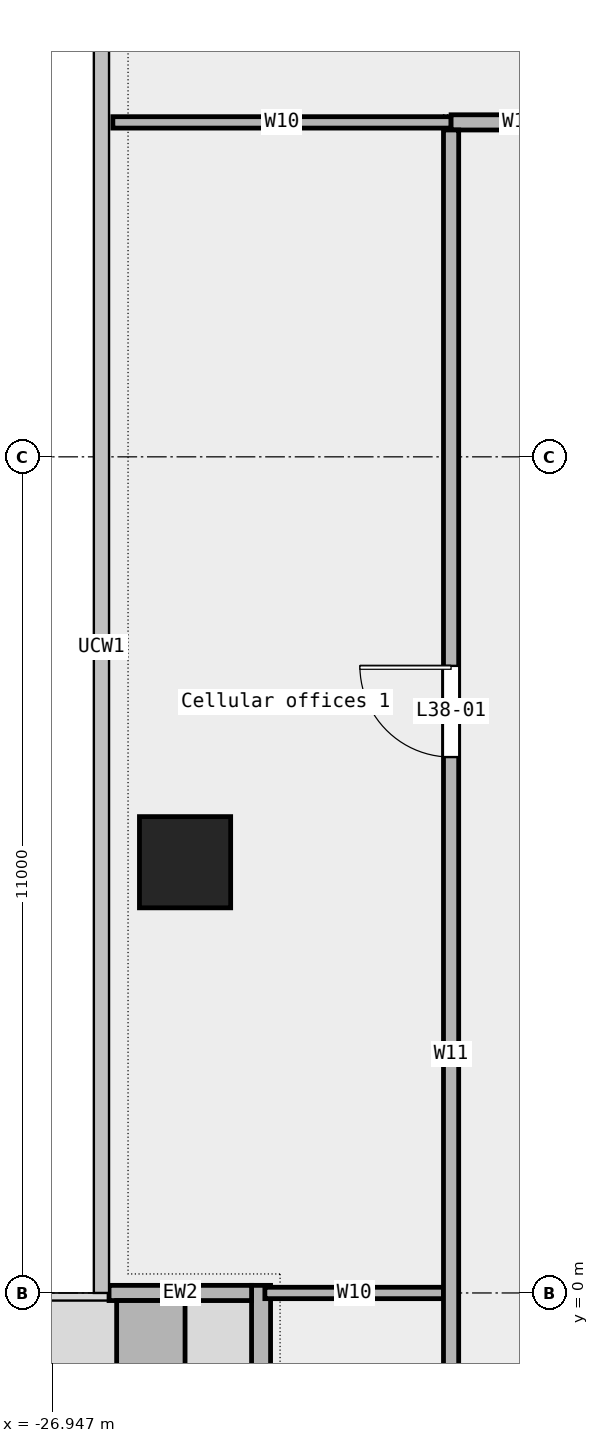
"""IFC4 building model, lengths in metres.
Left out: names, types, materials, properties, quantities, classifications, styles, units other than length and angle.
Written with IfcOpenShell. Run it as: python <this file> out.ifc"""

import sys

from ifc_helpers import new_model, si_unit, direction, frame, frame_2d, origin, origin_2d, place, context, subcontext, project, spatial, rectangle, extrude, element, fill, save


model = new_model("IFC4")
c1 = context("Model", 3, precision=1e-05, world=origin(), true_north=direction((0.0, 1.0)))
c2 = subcontext(c1, "Body", "Model", "MODEL_VIEW")
j1 = project(units=[si_unit("LENGTHUNIT", "METRE"), si_unit("PLANEANGLEUNIT", "RADIAN")], contexts=[c1])
p1 = place(None, origin())
s1 = spatial("IfcSite", under=j1, at=p1, CompositionType="ELEMENT")
p2 = place(p1, origin())
s2 = spatial("IfcBuilding", under=s1, at=p2, CompositionType="ELEMENT")
p3 = place(p2, frame((0.0, 0.0, 185.0)))
s3 = spatial("IfcBuildingStorey", under=s2, at=p3, CompositionType="ELEMENT", Elevation=185.0)
p4 = place(p3, frame((-25.2, 5.667, 0.0), z_axis=(0.0, 0.0, 1.0), x_axis=(1.0, 0.0, 0.0)))
e1 = element("IfcColumn", 1, at=p4, inside=s3, PredefinedType="COLUMN", context=c2, shape_type="SweptSolid", body=[
    extrude(rectangle(XDim=1.2, YDim=1.2, at=origin_2d()), origin(), (0.0, 0.0, 1.0), 3.6),
])
p5 = place(p3, frame((-24.2, 0.1, 0.0), z_axis=(0.0, 0.0, 1.0), x_axis=(0.0, -1.0, 0.0)))
e2 = element("IfcWall", 2, at=p5, inside=s3, PredefinedType="STANDARD", context=c2, shape_type="SweptSolid", body=[
    extrude(rectangle(XDim=12.95, YDim=0.25, at=frame_2d((6.475, 0.0))), origin(), (0.0, 0.0, 1.0), 3.6),
])
p6 = place(p5, frame((1.5, 0.0, 0.45)))
e3 = element("IfcOpeningElement", 3, at=p6, cuts=e2, PredefinedType="OPENING", context=c2, shape_type="SweptSolid", body=[
    extrude(rectangle(XDim=1.5, YDim=2.4, at=frame_2d((0.75, 1.2))), frame((0.0, 0.137, 0.0), z_axis=(0.0, -1.0, 0.0), x_axis=(1.0, 0.0, 0.0)), (0.0, 0.0, 1.0), 0.274),
])
p7 = place(p5, frame((6.75, 0.0, 0.0)))
e4 = element("IfcOpeningElement", 4, at=p7, cuts=e2, PredefinedType="OPENING", context=c2, shape_type="SweptSolid", body=[
    extrude(rectangle(XDim=1.8, YDim=2.4, at=frame_2d((0.9, 1.2))), frame((0.0, 0.137, 0.0), z_axis=(0.0, -1.0, 0.0), x_axis=(1.0, 0.0, 0.0)), (0.0, 0.0, 1.0), 0.274),
])
p8 = place(p5, frame((10.0, 0.0, 0.45)))
e5 = element("IfcOpeningElement", 5, at=p8, cuts=e2, PredefinedType="OPENING", context=c2, shape_type="SweptSolid", body=[
    extrude(rectangle(XDim=1.5, YDim=2.4, at=frame_2d((0.75, 1.2))), frame((0.0, 0.137, 0.0), z_axis=(0.0, -1.0, 0.0), x_axis=(1.0, 0.0, 0.0)), (0.0, 0.0, 1.0), 0.274),
])
p9 = place(p3, frame((-26.2, 0.0, 0.0), z_axis=(0.0, 0.0, 1.0), x_axis=(1.0, 0.0, 0.0)))
e6 = element("IfcWall", 6, at=p9, inside=s3, PredefinedType="STANDARD", context=c2, shape_type="SweptSolid", body=[
    extrude(rectangle(XDim=1.875, YDim=0.2, at=frame_2d((0.938, 0.0))), origin(), (0.0, 0.0, 1.0), 3.6),
])
p10 = place(p3, frame((-25.65, -0.1, 0.0), z_axis=(0.0, 0.0, 1.0), x_axis=(0.0, -1.0, 0.0)))
e7 = element("IfcWall", 7, at=p10, inside=s3, PredefinedType="STANDARD", context=c2, shape_type="SweptSolid", body=[
    extrude(rectangle(XDim=3.6, YDim=0.9, at=frame_2d((1.8, 0.0))), origin(), (0.0, 0.0, 1.0), 0.7),
])
p11 = place(p3, frame((-24.15, 0.0, 0.0), z_axis=(0.0, 0.0, 1.0), x_axis=(1.0, 0.0, 0.0)))
e8 = element("IfcWall", 8, at=p11, inside=s3, PredefinedType="PARTITIONING", context=c2, shape_type="SweptSolid", body=[
    extrude(rectangle(XDim=2.35, YDim=0.15, at=frame_2d((1.175, 0.0))), origin(), (0.0, 0.0, 1.0), 3.6),
])
p12 = place(p3, frame((-26.15, 15.4, 0.0), z_axis=(0.0, 0.0, 1.0), x_axis=(1.0, 0.0, 0.0)))
e9 = element("IfcWall", 9, at=p12, inside=s3, PredefinedType="PARTITIONING", context=c2, shape_type="SweptSolid", body=[
    extrude(rectangle(XDim=4.45, YDim=0.15, at=frame_2d((2.225, 0.0))), origin(), (0.0, 0.0, 1.0), 3.6),
])
p13 = place(p3, frame((-21.7, 15.4, 0.0), z_axis=(0.0, 0.0, 1.0), x_axis=(1.0, 0.0, 0.0)))
e10 = element("IfcWall", 10, at=p13, inside=s3, PredefinedType="PARTITIONING", context=c2, shape_type="SweptSolid", body=[
    extrude(rectangle(XDim=1.8, YDim=0.2, at=frame_2d((0.9, 0.0))), origin(), (0.0, 0.0, 1.0), 3.6),
])
p14 = place(p3, frame((-21.7, -9.0, 0.0), z_axis=(0.0, 0.0, 1.0), x_axis=(0.0, 1.0, 0.0)))
e11 = element("IfcWall", 11, at=p14, inside=s3, PredefinedType="PARTITIONING", context=c2, shape_type="SweptSolid", body=[
    extrude(rectangle(XDim=24.3, YDim=0.2, at=frame_2d((12.15, 0.0))), origin(), (0.0, 0.0, 1.0), 3.6),
])
p15 = place(p14, frame((16.05, 0.0, 0.0)))
e12 = element("IfcOpeningElement", 12, at=p15, cuts=e11, PredefinedType="OPENING", context=c2, shape_type="SweptSolid", body=[
    extrude(rectangle(XDim=1.2, YDim=2.1, at=frame_2d((0.6, 1.05))), frame((0.0, 0.112, 0.0), z_axis=(0.0, -1.0, 0.0), x_axis=(1.0, 0.0, 0.0)), (0.0, 0.0, 1.0), 0.224),
])
p16 = place(p15, origin())
e13 = element("IfcDoor", 13, at=p16, inside=s3, OperationType="SINGLE_SWING_RIGHT", PredefinedType="DOOR", context=c2, shape_type="SweptSolid", body=[
    extrude(rectangle(XDim=1.2, YDim=2.1, at=frame_2d((0.6, 1.05))), frame((0.0, 0.025, 0.0), z_axis=(0.0, -1.0, 0.0), x_axis=(1.0, 0.0, 0.0)), (0.0, 0.0, 1.0), 0.05),
])
fill(e12, e13)
save(model, sys.argv[1])
